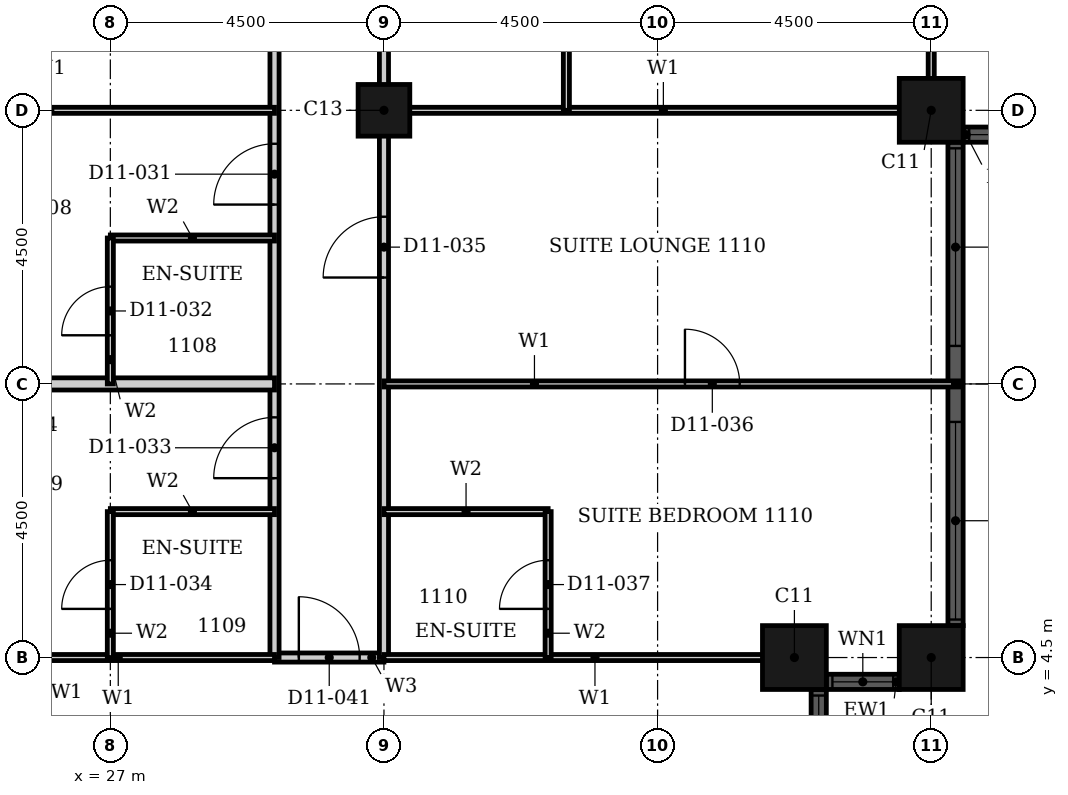
"""IFC4 building model, lengths in metres.
Left out: names, types, materials, properties, quantities, classifications, styles, units other than length and angle.
Written with IfcOpenShell. Run it as: python <this file> out.ifc"""

import sys

from ifc_helpers import new_model, si_unit, direction, frame, frame_2d, origin, origin_2d, place, context, subcontext, project, spatial, rectangle, hollow_rectangle, extrude, element, fill, save


model = new_model("IFC4")
c1 = context("Model", 3, precision=1e-05, world=origin(), true_north=direction((0.0, 1.0)))
c2 = subcontext(c1, "Body", "Model", "MODEL_VIEW")
j1 = project(units=[si_unit("LENGTHUNIT", "METRE"), si_unit("PLANEANGLEUNIT", "RADIAN")], contexts=[c1])
p1 = place(None, origin())
s1 = spatial("IfcSite", under=j1, at=p1, CompositionType="ELEMENT")
p2 = place(p1, origin())
s2 = spatial("IfcBuilding", under=s1, at=p2, CompositionType="ELEMENT")
p3 = place(p2, frame((0.0, 0.0, 52.8)))
s3 = spatial("IfcBuildingStorey", under=s2, at=p3, CompositionType="ELEMENT", Elevation=52.8)
for number, where, z_axis, x_axis in (
    (1, (38.25, 4.5, 0.0), (0.0, 0.0, 1.0), (1.0, 0.0, 0.0)),
    (2, (40.5, 4.5, 0.0), (0.0, 0.0, 1.0), (1.0, 0.0, 0.0)),
    (3, (40.5, 13.5, 0.0), (0.0, 0.0, 1.0), (1.0, 0.0, 0.0)),
):
    element("IfcColumn", number, at=place(p3, frame(where, z_axis=z_axis, x_axis=x_axis)), inside=s3, PredefinedType="COLUMN", context=c2, shape_type="SweptSolid", body=[
        extrude(hollow_rectangle(XDim=1.05, YDim=1.05, WallThickness=0.034, at=origin_2d()), origin(), (0.0, 0.0, 1.0), 3.6),
    ])
p4 = place(p3, frame((31.5, 13.5, 0.0), z_axis=(0.0, 0.0, 1.0), x_axis=(1.0, 0.0, 0.0)))
e4 = element("IfcColumn", 4, at=p4, inside=s3, PredefinedType="COLUMN", context=c2, shape_type="SweptSolid", body=[
    extrude(hollow_rectangle(XDim=0.85, YDim=0.85, WallThickness=0.026, at=origin_2d()), origin(), (0.0, 0.0, 1.0), 3.6),
])
p5 = place(p3, frame((38.65, 2.775, 0.0), z_axis=(0.0, 0.0, 1.0), x_axis=(0.0, 1.0, 0.0)))
e5 = element("IfcWall", 5, at=p5, inside=s3, PredefinedType="SOLIDWALL", context=c2, shape_type="SweptSolid", body=[
    extrude(rectangle(XDim=1.2, YDim=0.25, at=frame_2d((0.6, 0.0))), origin(), (0.0, 0.0, 1.0), 3.6),
])
p6 = place(p5, frame((0.1, 0.0, 0.9)))
e6 = element("IfcOpeningElement", 6, at=p6, cuts=e5, PredefinedType="OPENING", context=c2, shape_type="SweptSolid", body=[
    extrude(rectangle(XDim=1.0, YDim=2.08, at=frame_2d((0.5, 1.04))), frame((0.0, 0.135, 0.0), z_axis=(0.0, -1.0, 0.0), x_axis=(1.0, 0.0, 0.0)), (0.0, 0.0, 1.0), 0.27),
])
p7 = place(p3, frame((38.775, 4.1, 0.0), z_axis=(0.0, 0.0, 1.0), x_axis=(1.0, 0.0, 0.0)))
e7 = element("IfcWall", 7, at=p7, inside=s3, PredefinedType="SOLIDWALL", context=c2, shape_type="SweptSolid", body=[
    extrude(rectangle(XDim=1.2, YDim=0.25, at=frame_2d((0.6, 0.0))), origin(), (0.0, 0.0, 1.0), 3.6),
])
p8 = place(p7, frame((0.1, 0.0, 0.9)))
e8 = element("IfcOpeningElement", 8, at=p8, cuts=e7, PredefinedType="OPENING", context=c2, shape_type="SweptSolid", body=[
    extrude(rectangle(XDim=1.0, YDim=2.08, at=frame_2d((0.5, 1.04))), frame((0.0, 0.135, 0.0), z_axis=(0.0, -1.0, 0.0), x_axis=(1.0, 0.0, 0.0)), (0.0, 0.0, 1.0), 0.27),
])
p9 = place(p3, frame((40.9, 5.025, 0.0), z_axis=(0.0, 0.0, 1.0), x_axis=(0.0, 1.0, 0.0)))
e9 = element("IfcWall", 9, at=p9, inside=s3, PredefinedType="SOLIDWALL", context=c2, shape_type="SweptSolid", body=[
    extrude(rectangle(XDim=7.95, YDim=0.25, at=frame_2d((3.975, 0.0))), origin(), (0.0, 0.0, 1.0), 3.6),
])
p10 = place(p9, frame((0.1, 0.0, 0.9)))
e10 = element("IfcOpeningElement", 10, at=p10, cuts=e9, PredefinedType="OPENING", context=c2, shape_type="SweptSolid", body=[
    extrude(rectangle(XDim=3.25, YDim=2.08, at=frame_2d((1.625, 1.04))), frame((0.0, 0.135, 0.0), z_axis=(0.0, -1.0, 0.0), x_axis=(1.0, 0.0, 0.0)), (0.0, 0.0, 1.0), 0.27),
])
p11 = place(p9, frame((4.6, 0.0, 0.9)))
e11 = element("IfcOpeningElement", 11, at=p11, cuts=e9, PredefinedType="OPENING", context=c2, shape_type="SweptSolid", body=[
    extrude(rectangle(XDim=3.25, YDim=2.08, at=frame_2d((1.625, 1.04))), frame((0.0, 0.135, 0.0), z_axis=(0.0, -1.0, 0.0), x_axis=(1.0, 0.0, 0.0)), (0.0, 0.0, 1.0), 0.27),
])
p12 = place(p3, frame((41.025, 13.1, 0.0), z_axis=(0.0, 0.0, 1.0), x_axis=(1.0, 0.0, 0.0)))
e12 = element("IfcWall", 12, at=p12, inside=s3, PredefinedType="SOLIDWALL", context=c2, shape_type="SweptSolid", body=[
    extrude(rectangle(XDim=3.45, YDim=0.25, at=frame_2d((1.725, 0.0))), origin(), (0.0, 0.0, 1.0), 3.6),
])
p13 = place(p12, frame((0.1, 0.0, 0.9)))
e13 = element("IfcOpeningElement", 13, at=p13, cuts=e12, PredefinedType="OPENING", context=c2, shape_type="SweptSolid", body=[
    extrude(rectangle(XDim=3.25, YDim=2.08, at=frame_2d((1.625, 1.04))), frame((0.0, 0.135, 0.0), z_axis=(0.0, -1.0, 0.0), x_axis=(1.0, 0.0, 0.0)), (0.0, 0.0, 1.0), 0.27),
])
p14 = place(p3, frame((29.7, 4.5, 0.0), z_axis=(0.0, 0.0, 1.0), x_axis=(1.0, 0.0, 0.0)))
e14 = element("IfcWall", 14, at=p14, inside=s3, PredefinedType="PARTITIONING", context=c2, shape_type="SweptSolid", body=[
    extrude(rectangle(XDim=1.8, YDim=0.15, at=frame_2d((0.9, 0.0))), origin(), (0.0, 0.0, 1.0), 3.3),
])
p15 = place(p14, frame((0.4, 0.0, 0.0)))
e15 = element("IfcOpeningElement", 15, at=p15, cuts=e14, PredefinedType="OPENING", context=c2, shape_type="SweptSolid", body=[
    extrude(rectangle(XDim=1.0, YDim=2.1, at=frame_2d((0.5, 1.05))), frame((0.0, 0.085, 0.0), z_axis=(0.0, -1.0, 0.0), x_axis=(1.0, 0.0, 0.0)), (0.0, 0.0, 1.0), 0.17),
])
p16 = place(p3, frame((29.7, 4.5, 0.0), z_axis=(0.0, 0.0, 1.0), x_axis=(0.0, 1.0, 0.0)))
e16 = element("IfcWall", 16, at=p16, inside=s3, PredefinedType="PARTITIONING", context=c2, shape_type="SweptSolid", body=[
    extrude(rectangle(XDim=16.2, YDim=0.15, at=frame_2d((8.1, 0.0))), origin(), (0.0, 0.0, 1.0), 3.3),
])
p17 = place(p16, frame((7.45, 0.0, 0.0)))
e17 = element("IfcOpeningElement", 17, at=p17, cuts=e16, PredefinedType="OPENING", context=c2, shape_type="SweptSolid", body=[
    extrude(rectangle(XDim=1.0, YDim=2.1, at=frame_2d((0.5, 1.05))), frame((0.0, 0.085, 0.0), z_axis=(0.0, -1.0, 0.0), x_axis=(1.0, 0.0, 0.0)), (0.0, 0.0, 1.0), 0.17),
])
p18 = place(p16, frame((2.95, 0.0, 0.0)))
e18 = element("IfcOpeningElement", 18, at=p18, cuts=e16, PredefinedType="OPENING", context=c2, shape_type="SweptSolid", body=[
    extrude(rectangle(XDim=1.0, YDim=2.1, at=frame_2d((0.5, 1.05))), frame((0.0, 0.085, 0.0), z_axis=(0.0, -1.0, 0.0), x_axis=(1.0, 0.0, 0.0)), (0.0, 0.0, 1.0), 0.17),
])
p19 = place(p3, frame((31.5, 4.5, 0.0), z_axis=(0.0, 0.0, 1.0), x_axis=(0.0, 1.0, 0.0)))
e19 = element("IfcWall", 19, at=p19, inside=s3, PredefinedType="PARTITIONING", context=c2, shape_type="SweptSolid", body=[
    extrude(rectangle(XDim=16.2, YDim=0.15, at=frame_2d((8.1, 0.0))), origin(), (0.0, 0.0, 1.0), 2.58),
])
p20 = place(p19, frame((6.25, 0.0, 0.0)))
e20 = element("IfcOpeningElement", 20, at=p20, cuts=e19, PredefinedType="OPENING", context=c2, shape_type="SweptSolid", body=[
    extrude(rectangle(XDim=1.0, YDim=2.1, at=frame_2d((0.5, 1.05))), frame((0.0, 0.085, 0.0), z_axis=(0.0, -1.0, 0.0), x_axis=(1.0, 0.0, 0.0)), (0.0, 0.0, 1.0), 0.17),
])
p21 = place(p3, frame((22.31, 13.5, 0.0), z_axis=(0.0, 0.0, 1.0), x_axis=(1.0, 0.0, 0.0)))
e21 = element("IfcWall", 21, at=p21, inside=s3, PredefinedType="PARTITIONING", context=c2, shape_type="SweptSolid", body=[
    extrude(rectangle(XDim=7.39, YDim=0.1, at=frame_2d((3.695, 0.0))), origin(), (0.0, 0.0, 1.0), 2.38),
])
p22 = place(p3, frame((31.5, 13.5, 0.0), z_axis=(0.0, 0.0, 1.0), x_axis=(1.0, 0.0, 0.0)))
e22 = element("IfcWall", 22, at=p22, inside=s3, PredefinedType="PARTITIONING", context=c2, shape_type="SweptSolid", body=[
    extrude(rectangle(XDim=9.19, YDim=0.1, at=frame_2d((4.595, 0.0))), origin(), (0.0, 0.0, 1.0), 2.38),
])
p23 = place(p3, frame((24.56, 4.5, 0.0), z_axis=(0.0, 0.0, 1.0), x_axis=(1.0, 0.0, 0.0)))
e23 = element("IfcWall", 23, at=p23, inside=s3, PredefinedType="PARTITIONING", context=c2, shape_type="SweptSolid", body=[
    extrude(rectangle(XDim=5.14, YDim=0.1, at=frame_2d((2.57, 0.0))), origin(), (0.0, 0.0, 1.0), 3.3),
])
p24 = place(p3, frame((31.5, 4.5, 0.0), z_axis=(0.0, 0.0, 1.0), x_axis=(1.0, 0.0, 0.0)))
e24 = element("IfcWall", 24, at=p24, inside=s3, PredefinedType="PARTITIONING", context=c2, shape_type="SweptSolid", body=[
    extrude(rectangle(XDim=6.94, YDim=0.1, at=frame_2d((3.47, 0.0))), origin(), (0.0, 0.0, 1.0), 3.3),
])
p25 = place(p3, frame((31.5, 9.0, 0.0), z_axis=(0.0, 0.0, 1.0), x_axis=(1.0, 0.0, 0.0)))
e25 = element("IfcWall", 25, at=p25, inside=s3, PredefinedType="PARTITIONING", context=c2, shape_type="SweptSolid", body=[
    extrude(rectangle(XDim=9.465, YDim=0.1, at=frame_2d((4.732, 0.0))), origin(), (0.0, 0.0, 1.0), 3.3),
])
p26 = place(p25, frame((4.95, 0.0, 0.0)))
e26 = element("IfcOpeningElement", 26, at=p26, cuts=e25, PredefinedType="OPENING", context=c2, shape_type="SweptSolid", body=[
    extrude(rectangle(XDim=0.9, YDim=2.1, at=frame_2d((0.45, 1.05))), frame((0.0, 0.06, 0.0), z_axis=(0.0, -1.0, 0.0), x_axis=(1.0, 0.0, 0.0)), (0.0, 0.0, 1.0), 0.12),
])
p27 = place(p3, frame((34.5, 13.5, 0.0), z_axis=(0.0, 0.0, 1.0), x_axis=(0.0, 1.0, 0.0)))
e27 = element("IfcWall", 27, at=p27, inside=s3, PredefinedType="PARTITIONING", context=c2, shape_type="SweptSolid", body=[
    extrude(rectangle(XDim=7.2, YDim=0.1, at=frame_2d((3.6, 0.0))), origin(), (0.0, 0.0, 1.0), 3.3),
])
p28 = place(p3, frame((40.5, 13.31, 0.0), z_axis=(0.0, 0.0, 1.0), x_axis=(0.0, 1.0, 0.0)))
e28 = element("IfcWall", 28, at=p28, inside=s3, PredefinedType="PARTITIONING", context=c2, shape_type="SweptSolid", body=[
    extrude(rectangle(XDim=7.39, YDim=0.1, at=frame_2d((3.695, 0.0))), origin(), (0.0, 0.0, 1.0), 3.3),
])
p29 = place(p3, frame((22.035, 9.0, 0.0), z_axis=(0.0, 0.0, 1.0), x_axis=(1.0, 0.0, 0.0)))
e29 = element("IfcWall", 29, at=p29, inside=s3, PredefinedType="PARTITIONING", context=c2, shape_type="SweptSolid", body=[
    extrude(rectangle(XDim=7.665, YDim=0.2, at=frame_2d((3.833, 0.0))), origin(), (0.0, 0.0, 1.0), 3.3),
])
for number, where, z_axis, x_axis in (
    (30, (27.0, 11.4, 0.0), (0.0, 0.0, 1.0), (1.0, 0.0, 0.0)),
    (31, (27.0, 6.9, 0.0), (0.0, 0.0, 1.0), (1.0, 0.0, 0.0)),
    (32, (31.5, 6.9, 0.0), (0.0, 0.0, 1.0), (1.0, 0.0, 0.0)),
):
    element("IfcWall", number, at=place(p3, frame(where, z_axis=z_axis, x_axis=x_axis)), inside=s3, PredefinedType="PARTITIONING", context=c2, shape_type="SweptSolid", body=[
        extrude(rectangle(XDim=2.7, YDim=0.1, at=frame_2d((1.35, 0.0))), origin(), (0.0, 0.0, 1.0), 3.3),
    ])
p30 = place(p3, frame((27.0, 9.0, 0.0), z_axis=(0.0, 0.0, 1.0), x_axis=(0.0, 1.0, 0.0)))
e33 = element("IfcWall", 33, at=p30, inside=s3, PredefinedType="PARTITIONING", context=c2, shape_type="SweptSolid", body=[
    extrude(rectangle(XDim=2.4, YDim=0.1, at=frame_2d((1.2, 0.0))), origin(), (0.0, 0.0, 1.0), 2.58),
])
p31 = place(p30, frame((0.8, 0.0, 0.0)))
e34 = element("IfcOpeningElement", 34, at=p31, cuts=e33, PredefinedType="OPENING", context=c2, shape_type="SweptSolid", body=[
    extrude(rectangle(XDim=0.8, YDim=2.1, at=frame_2d((0.4, 1.05))), frame((0.0, 0.06, 0.0), z_axis=(0.0, -1.0, 0.0), x_axis=(1.0, 0.0, 0.0)), (0.0, 0.0, 1.0), 0.12),
])
p32 = place(p3, frame((27.0, 4.5, 0.0), z_axis=(0.0, 0.0, 1.0), x_axis=(0.0, 1.0, 0.0)))
e35 = element("IfcWall", 35, at=p32, inside=s3, PredefinedType="PARTITIONING", context=c2, shape_type="SweptSolid", body=[
    extrude(rectangle(XDim=2.4, YDim=0.1, at=frame_2d((1.2, 0.0))), origin(), (0.0, 0.0, 1.0), 2.58),
])
p33 = place(p32, frame((0.8, 0.0, 0.0)))
e36 = element("IfcOpeningElement", 36, at=p33, cuts=e35, PredefinedType="OPENING", context=c2, shape_type="SweptSolid", body=[
    extrude(rectangle(XDim=0.8, YDim=2.1, at=frame_2d((0.4, 1.05))), frame((0.0, 0.06, 0.0), z_axis=(0.0, -1.0, 0.0), x_axis=(1.0, 0.0, 0.0)), (0.0, 0.0, 1.0), 0.12),
])
p34 = place(p3, frame((34.2, 4.5, 0.0), z_axis=(0.0, 0.0, 1.0), x_axis=(0.0, 1.0, 0.0)))
e37 = element("IfcWall", 37, at=p34, inside=s3, PredefinedType="PARTITIONING", context=c2, shape_type="SweptSolid", body=[
    extrude(rectangle(XDim=2.4, YDim=0.1, at=frame_2d((1.2, 0.0))), origin(), (0.0, 0.0, 1.0), 3.3),
])
p35 = place(p34, frame((0.8, 0.0, 0.0)))
e38 = element("IfcOpeningElement", 38, at=p35, cuts=e37, PredefinedType="OPENING", context=c2, shape_type="SweptSolid", body=[
    extrude(rectangle(XDim=0.8, YDim=2.1, at=frame_2d((0.4, 1.05))), frame((0.0, 0.06, 0.0), z_axis=(0.0, -1.0, 0.0), x_axis=(1.0, 0.0, 0.0)), (0.0, 0.0, 1.0), 0.12),
])
p36 = place(p6, origin())
e39 = element("IfcWindow", 39, at=p36, inside=s3, PartitioningType="SINGLE_PANEL", PredefinedType="WINDOW", context=c2, shape_type="SweptSolid", body=[
    extrude(rectangle(XDim=1.0, YDim=2.08, at=frame_2d((0.5, 1.04))), frame((0.0, 0.03, 0.0), z_axis=(0.0, -1.0, 0.0), x_axis=(1.0, 0.0, 0.0)), (0.0, 0.0, 1.0), 0.06),
])
fill(e6, e39)
p37 = place(p8, origin())
e40 = element("IfcWindow", 40, at=p37, inside=s3, PartitioningType="SINGLE_PANEL", PredefinedType="WINDOW", context=c2, shape_type="SweptSolid", body=[
    extrude(rectangle(XDim=1.0, YDim=2.08, at=frame_2d((0.5, 1.04))), frame((0.0, 0.03, 0.0), z_axis=(0.0, -1.0, 0.0), x_axis=(1.0, 0.0, 0.0)), (0.0, 0.0, 1.0), 0.06),
])
fill(e8, e40)
p38 = place(p10, origin())
e41 = element("IfcWindow", 41, at=p38, inside=s3, PartitioningType="SINGLE_PANEL", PredefinedType="WINDOW", context=c2, shape_type="SweptSolid", body=[
    extrude(rectangle(XDim=3.25, YDim=2.08, at=frame_2d((1.625, 1.04))), frame((0.0, 0.03, 0.0), z_axis=(0.0, -1.0, 0.0), x_axis=(1.0, 0.0, 0.0)), (0.0, 0.0, 1.0), 0.06),
])
fill(e10, e41)
p39 = place(p11, origin())
e42 = element("IfcWindow", 42, at=p39, inside=s3, PartitioningType="SINGLE_PANEL", PredefinedType="WINDOW", context=c2, shape_type="SweptSolid", body=[
    extrude(rectangle(XDim=3.25, YDim=2.08, at=frame_2d((1.625, 1.04))), frame((0.0, 0.03, 0.0), z_axis=(0.0, -1.0, 0.0), x_axis=(1.0, 0.0, 0.0)), (0.0, 0.0, 1.0), 0.06),
])
fill(e11, e42)
p40 = place(p13, origin())
e43 = element("IfcWindow", 43, at=p40, inside=s3, PartitioningType="SINGLE_PANEL", PredefinedType="WINDOW", context=c2, shape_type="SweptSolid", body=[
    extrude(rectangle(XDim=3.25, YDim=2.08, at=frame_2d((1.625, 1.04))), frame((0.0, 0.03, 0.0), z_axis=(0.0, -1.0, 0.0), x_axis=(1.0, 0.0, 0.0)), (0.0, 0.0, 1.0), 0.06),
])
fill(e13, e43)
p41 = place(p17, origin())
e44 = element("IfcDoor", 44, at=p41, inside=s3, OperationType="SINGLE_SWING_RIGHT", PredefinedType="DOOR", context=c2, shape_type="SweptSolid", body=[
    extrude(rectangle(XDim=1.0, YDim=2.1, at=frame_2d((0.5, 1.05))), frame((0.0, 0.025, 0.0), z_axis=(0.0, -1.0, 0.0), x_axis=(1.0, 0.0, 0.0)), (0.0, 0.0, 1.0), 0.05),
])
fill(e17, e44)
p42 = place(p31, origin())
e45 = element("IfcDoor", 45, at=p42, inside=s3, OperationType="SINGLE_SWING_LEFT", PredefinedType="DOOR", context=c2, shape_type="SweptSolid", body=[
    extrude(rectangle(XDim=0.8, YDim=2.1, at=frame_2d((0.4, 1.05))), frame((0.0, 0.025, 0.0), z_axis=(0.0, -1.0, 0.0), x_axis=(1.0, 0.0, 0.0)), (0.0, 0.0, 1.0), 0.05),
])
fill(e34, e45)
p43 = place(p18, origin())
e46 = element("IfcDoor", 46, at=p43, inside=s3, OperationType="SINGLE_SWING_RIGHT", PredefinedType="DOOR", context=c2, shape_type="SweptSolid", body=[
    extrude(rectangle(XDim=1.0, YDim=2.1, at=frame_2d((0.5, 1.05))), frame((0.0, 0.025, 0.0), z_axis=(0.0, -1.0, 0.0), x_axis=(1.0, 0.0, 0.0)), (0.0, 0.0, 1.0), 0.05),
])
fill(e18, e46)
p44 = place(p33, origin())
e47 = element("IfcDoor", 47, at=p44, inside=s3, OperationType="SINGLE_SWING_LEFT", PredefinedType="DOOR", context=c2, shape_type="SweptSolid", body=[
    extrude(rectangle(XDim=0.8, YDim=2.1, at=frame_2d((0.4, 1.05))), frame((0.0, 0.025, 0.0), z_axis=(0.0, -1.0, 0.0), x_axis=(1.0, 0.0, 0.0)), (0.0, 0.0, 1.0), 0.05),
])
fill(e36, e47)
p45 = place(p20, origin())
e48 = element("IfcDoor", 48, at=p45, inside=s3, OperationType="SINGLE_SWING_RIGHT", PredefinedType="DOOR", context=c2, shape_type="SweptSolid", body=[
    extrude(rectangle(XDim=1.0, YDim=2.1, at=frame_2d((0.5, 1.05))), frame((0.0, 0.025, 0.0), z_axis=(0.0, -1.0, 0.0), x_axis=(1.0, 0.0, 0.0)), (0.0, 0.0, 1.0), 0.05),
])
fill(e20, e48)
p46 = place(p26, origin())
e49 = element("IfcDoor", 49, at=p46, inside=s3, OperationType="SINGLE_SWING_RIGHT", PredefinedType="DOOR", context=c2, shape_type="SweptSolid", body=[
    extrude(rectangle(XDim=0.9, YDim=2.1, at=frame_2d((0.45, 1.05))), frame((0.0, 0.025, 0.0), z_axis=(0.0, -1.0, 0.0), x_axis=(1.0, 0.0, 0.0)), (0.0, 0.0, 1.0), 0.05),
])
fill(e26, e49)
p47 = place(p35, origin())
e50 = element("IfcDoor", 50, at=p47, inside=s3, OperationType="SINGLE_SWING_LEFT", PredefinedType="DOOR", context=c2, shape_type="SweptSolid", body=[
    extrude(rectangle(XDim=0.8, YDim=2.1, at=frame_2d((0.4, 1.05))), frame((0.0, 0.025, 0.0), z_axis=(0.0, -1.0, 0.0), x_axis=(1.0, 0.0, 0.0)), (0.0, 0.0, 1.0), 0.05),
])
fill(e38, e50)
p48 = place(p15, origin())
e51 = element("IfcDoor", 51, at=p48, inside=s3, OperationType="SINGLE_SWING_LEFT", PredefinedType="DOOR", context=c2, shape_type="SweptSolid", body=[
    extrude(rectangle(XDim=1.0, YDim=2.1, at=frame_2d((0.5, 1.05))), frame((0.0, 0.025, 0.0), z_axis=(0.0, -1.0, 0.0), x_axis=(1.0, 0.0, 0.0)), (0.0, 0.0, 1.0), 0.05),
])
fill(e15, e51)
save(model, sys.argv[1])
